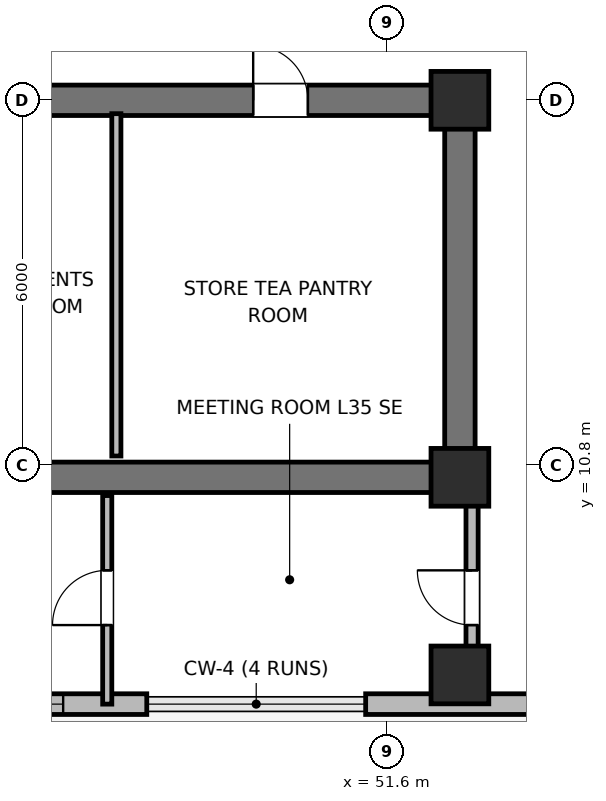
"""IFC4 building model, lengths in metres.
Left out: names, types, materials, properties, quantities, classifications, styles, units other than length and angle.
Written with IfcOpenShell. Run it as: python <this file> out.ifc"""

import sys

from ifc_helpers import new_model, si_unit, direction, frame, frame_2d, origin, origin_2d, place, context, subcontext, project, spatial, rectangle, extrude, element, fill, save


model = new_model("IFC4")
c1 = context("Model", 3, precision=1e-05, world=origin(), true_north=direction((0.0, 1.0)))
c2 = subcontext(c1, "Body", "Model", "MODEL_VIEW")
j1 = project(units=[si_unit("LENGTHUNIT", "METRE"), si_unit("PLANEANGLEUNIT", "RADIAN")], contexts=[c1])
p1 = place(None, origin())
s1 = spatial("IfcSite", under=j1, at=p1, CompositionType="ELEMENT")
p2 = place(p1, origin())
s2 = spatial("IfcBuilding", under=s1, at=p2, CompositionType="ELEMENT")
p3 = place(p2, frame((0.0, 0.0, 143.6)))
s3 = spatial("IfcBuildingStorey", under=s2, at=p3, CompositionType="ELEMENT", Elevation=143.6)
p4 = place(p3, frame((52.8, 10.6, 0.0), z_axis=(0.0, 0.0, 1.0), x_axis=(-1.0, 0.0, 0.0)))
e1 = element("IfcWall", 1, at=p4, inside=s3, PredefinedType="SHEAR", context=c2, shape_type="SweptSolid", body=[
    extrude(rectangle(XDim=27.2, YDim=0.5, at=frame_2d((13.6, 0.0))), origin(), (0.0, 0.0, 1.0), 4.2),
])
p5 = place(p3, frame((52.8, 10.85, 0.0), z_axis=(0.0, 0.0, 1.0), x_axis=(0.0, 1.0, 0.0)))
e2 = element("IfcWall", 2, at=p5, inside=s3, PredefinedType="SHEAR", context=c2, shape_type="SweptSolid", body=[
    extrude(rectangle(XDim=5.7, YDim=0.5, at=frame_2d((2.85, 0.0))), origin(), (0.0, 0.0, 1.0), 4.2),
])
p6 = place(p3, frame((25.6, 16.8, 0.0), z_axis=(0.0, 0.0, 1.0), x_axis=(1.0, 0.0, 0.0)))
e3 = element("IfcWall", 3, at=p6, inside=s3, PredefinedType="SHEAR", context=c2, shape_type="SweptSolid", body=[
    extrude(rectangle(XDim=27.2, YDim=0.5, at=frame_2d((13.6, 0.0))), origin(), (0.0, 0.0, 1.0), 4.2),
])
p7 = place(p6, frame((1.8, 0.0, 0.0)))
e4 = element("IfcOpeningElement", 4, at=p7, cuts=e3, PredefinedType="OPENING", context=c2, shape_type="SweptSolid", body=[
    extrude(rectangle(XDim=1.1, YDim=2.15, at=frame_2d((0.55, 1.075))), frame((0.0, 0.26, 0.0), z_axis=(0.0, -1.0, 0.0), x_axis=(1.0, 0.0, 0.0)), (0.0, 0.0, 1.0), 0.52),
])
p8 = place(p6, frame((5.6, 0.0, 0.0)))
e5 = element("IfcOpeningElement", 5, at=p8, cuts=e3, PredefinedType="OPENING", context=c2, shape_type="SweptSolid", body=[
    extrude(rectangle(XDim=0.85, YDim=2.1, at=frame_2d((0.425, 1.05))), frame((0.0, 0.26, 0.0), z_axis=(0.0, -1.0, 0.0), x_axis=(1.0, 0.0, 0.0)), (0.0, 0.0, 1.0), 0.52),
])
p9 = place(p6, frame((13.0, 0.0, 0.0)))
e6 = element("IfcOpeningElement", 6, at=p9, cuts=e3, PredefinedType="OPENING", context=c2, shape_type="SweptSolid", body=[
    extrude(rectangle(XDim=1.2, YDim=2.15, at=frame_2d((0.6, 1.075))), frame((0.0, 0.26, 0.0), z_axis=(0.0, -1.0, 0.0), x_axis=(1.0, 0.0, 0.0)), (0.0, 0.0, 1.0), 0.52),
])
p10 = place(p6, frame((19.2, 0.0, 0.0)))
e7 = element("IfcOpeningElement", 7, at=p10, cuts=e3, PredefinedType="OPENING", context=c2, shape_type="SweptSolid", body=[
    extrude(rectangle(XDim=0.85, YDim=2.1, at=frame_2d((0.425, 1.05))), frame((0.0, 0.26, 0.0), z_axis=(0.0, -1.0, 0.0), x_axis=(1.0, 0.0, 0.0)), (0.0, 0.0, 1.0), 0.52),
])
p11 = place(p6, frame((23.8, 0.0, 0.0)))
e8 = element("IfcOpeningElement", 8, at=p11, cuts=e3, PredefinedType="OPENING", context=c2, shape_type="SweptSolid", body=[
    extrude(rectangle(XDim=0.9, YDim=2.1, at=frame_2d((0.45, 1.05))), frame((0.0, 0.26, 0.0), z_axis=(0.0, -1.0, 0.0), x_axis=(1.0, 0.0, 0.0)), (0.0, 0.0, 1.0), 0.52),
])
for number, where, z_axis, x_axis in (
    (9, (52.8, 10.6, 0.0), (0.0, 0.0, 1.0), (1.0, 0.0, 0.0)),
    (10, (52.8, 16.8, 0.0), (0.0, 0.0, 1.0), (1.0, 0.0, 0.0)),
    (11, (52.8, 7.35, 0.0), (0.0, 0.0, 1.0), (1.0, 0.0, 0.0)),
):
    element("IfcColumn", number, at=place(p3, frame(where, z_axis=z_axis, x_axis=x_axis)), inside=s3, PredefinedType="COLUMN", context=c2, shape_type="SweptSolid", body=[
        extrude(rectangle(XDim=0.95, YDim=0.95, at=origin_2d()), origin(), (0.0, 0.0, 1.0), 4.2),
    ])
p12 = place(p3, frame((42.4, 6.87, 0.0), z_axis=(0.0, 0.0, 1.0), x_axis=(1.0, 0.0, 0.0)))
e12 = element("IfcWall", 12, at=p12, inside=s3, PredefinedType="SOLIDWALL", context=c2, shape_type="SweptSolid", body=[
    extrude(rectangle(XDim=5.25, YDim=0.34, at=frame_2d((2.625, 0.0))), origin(), (0.0, 0.0, 1.0), 3.22),
])
p13 = place(p12, frame((2.075, 0.0, 0.85)))
e13 = element("IfcOpeningElement", 13, at=p13, cuts=e12, PredefinedType="OPENING", context=c2, shape_type="SweptSolid", body=[
    extrude(rectangle(XDim=1.8, YDim=1.85, at=frame_2d((0.9, 0.925))), frame((0.0, 0.18, 0.0), z_axis=(0.0, -1.0, 0.0), x_axis=(1.0, 0.0, 0.0)), (0.0, 0.0, 1.0), 0.36),
])
p14 = place(p3, frame((51.25, 6.87, 0.0), z_axis=(0.0, 0.0, 1.0), x_axis=(1.0, 0.0, 0.0)))
e14 = element("IfcWall", 14, at=p14, inside=s3, PredefinedType="SOLIDWALL", context=c2, shape_type="SweptSolid", body=[
    extrude(rectangle(XDim=6.95, YDim=0.34, at=frame_2d((3.475, 0.0))), origin(), (0.0, 0.0, 1.0), 3.22),
])
p15 = place(p3, frame((47.15, 10.95, 0.0), z_axis=(0.0, 0.0, 1.0), x_axis=(0.0, 1.0, 0.0)))
e15 = element("IfcWall", 15, at=p15, inside=s3, PredefinedType="PARTITIONING", context=c2, shape_type="SweptSolid", body=[
    extrude(rectangle(XDim=5.63, YDim=0.15, at=frame_2d((2.815, 0.0))), origin(), (0.0, 0.0, 1.0), 3.05),
])
p16 = place(p3, frame((47.0, 6.87, 0.0), z_axis=(0.0, 0.0, 1.0), x_axis=(0.0, 1.0, 0.0)))
e16 = element("IfcWall", 16, at=p16, inside=s3, PredefinedType="PARTITIONING", context=c2, shape_type="SweptSolid", body=[
    extrude(rectangle(XDim=3.43, YDim=0.15, at=frame_2d((1.715, 0.0))), origin(), (0.0, 0.0, 1.0), 3.05),
])
p17 = place(p16, frame((1.3, 0.0, 0.0)))
e17 = element("IfcOpeningElement", 17, at=p17, cuts=e16, PredefinedType="OPENING", context=c2, shape_type="SweptSolid", body=[
    extrude(rectangle(XDim=0.9, YDim=2.1, at=frame_2d((0.45, 1.05))), frame((0.0, 0.085, 0.0), z_axis=(0.0, -1.0, 0.0), x_axis=(1.0, 0.0, 0.0)), (0.0, 0.0, 1.0), 0.17),
])
p18 = place(p3, frame((53.0, 7.52, 0.0), z_axis=(0.0, 0.0, 1.0), x_axis=(0.0, 1.0, 0.0)))
e18 = element("IfcWall", 18, at=p18, inside=s3, PredefinedType="PARTITIONING", context=c2, shape_type="SweptSolid", body=[
    extrude(rectangle(XDim=2.78, YDim=0.2, at=frame_2d((1.39, 0.0))), origin(), (0.0, 0.0, 1.0), 3.05),
])
p19 = place(p18, frame((0.65, 0.0, 0.0)))
e19 = element("IfcOpeningElement", 19, at=p19, cuts=e18, PredefinedType="OPENING", context=c2, shape_type="SweptSolid", body=[
    extrude(rectangle(XDim=0.9, YDim=2.1, at=frame_2d((0.45, 1.05))), frame((0.0, 0.11, 0.0), z_axis=(0.0, -1.0, 0.0), x_axis=(1.0, 0.0, 0.0)), (0.0, 0.0, 1.0), 0.22),
])
p20 = place(p13, origin())
e20 = element("IfcWindow", 20, at=p20, inside=s3, PartitioningType="SINGLE_PANEL", PredefinedType="WINDOW", context=c2, shape_type="SweptSolid", body=[
    extrude(rectangle(XDim=1.8, YDim=1.85, at=frame_2d((0.9, 0.925))), frame((0.0, 0.03, 0.0), z_axis=(0.0, -1.0, 0.0), x_axis=(1.0, 0.0, 0.0)), (0.0, 0.0, 1.0), 0.06),
])
fill(e13, e20)
p21 = place(p17, origin())
e21 = element("IfcDoor", 21, at=p21, inside=s3, OperationType="SINGLE_SWING_LEFT", PredefinedType="DOOR", context=c2, shape_type="SweptSolid", body=[
    extrude(rectangle(XDim=0.9, YDim=2.1, at=frame_2d((0.45, 1.05))), frame((0.0, 0.025, 0.0), z_axis=(0.0, -1.0, 0.0), x_axis=(1.0, 0.0, 0.0)), (0.0, 0.0, 1.0), 0.05),
])
fill(e17, e21)
p22 = place(p19, origin())
e22 = element("IfcDoor", 22, at=p22, inside=s3, OperationType="SINGLE_SWING_RIGHT", PredefinedType="DOOR", context=c2, shape_type="SweptSolid", body=[
    extrude(rectangle(XDim=0.9, YDim=2.1, at=frame_2d((0.45, 1.05))), frame((0.0, 0.025, 0.0), z_axis=(0.0, -1.0, 0.0), x_axis=(1.0, 0.0, 0.0)), (0.0, 0.0, 1.0), 0.05),
])
fill(e19, e22)
p23 = place(p11, origin())
e23 = element("IfcDoor", 23, at=p23, inside=s3, OperationType="SINGLE_SWING_LEFT", PredefinedType="DOOR", context=c2, shape_type="SweptSolid", body=[
    extrude(rectangle(XDim=0.9, YDim=2.1, at=frame_2d((0.45, 1.05))), frame((0.0, 0.025, 0.0), z_axis=(0.0, -1.0, 0.0), x_axis=(1.0, 0.0, 0.0)), (0.0, 0.0, 1.0), 0.05),
])
fill(e8, e23)
save(model, sys.argv[1])
